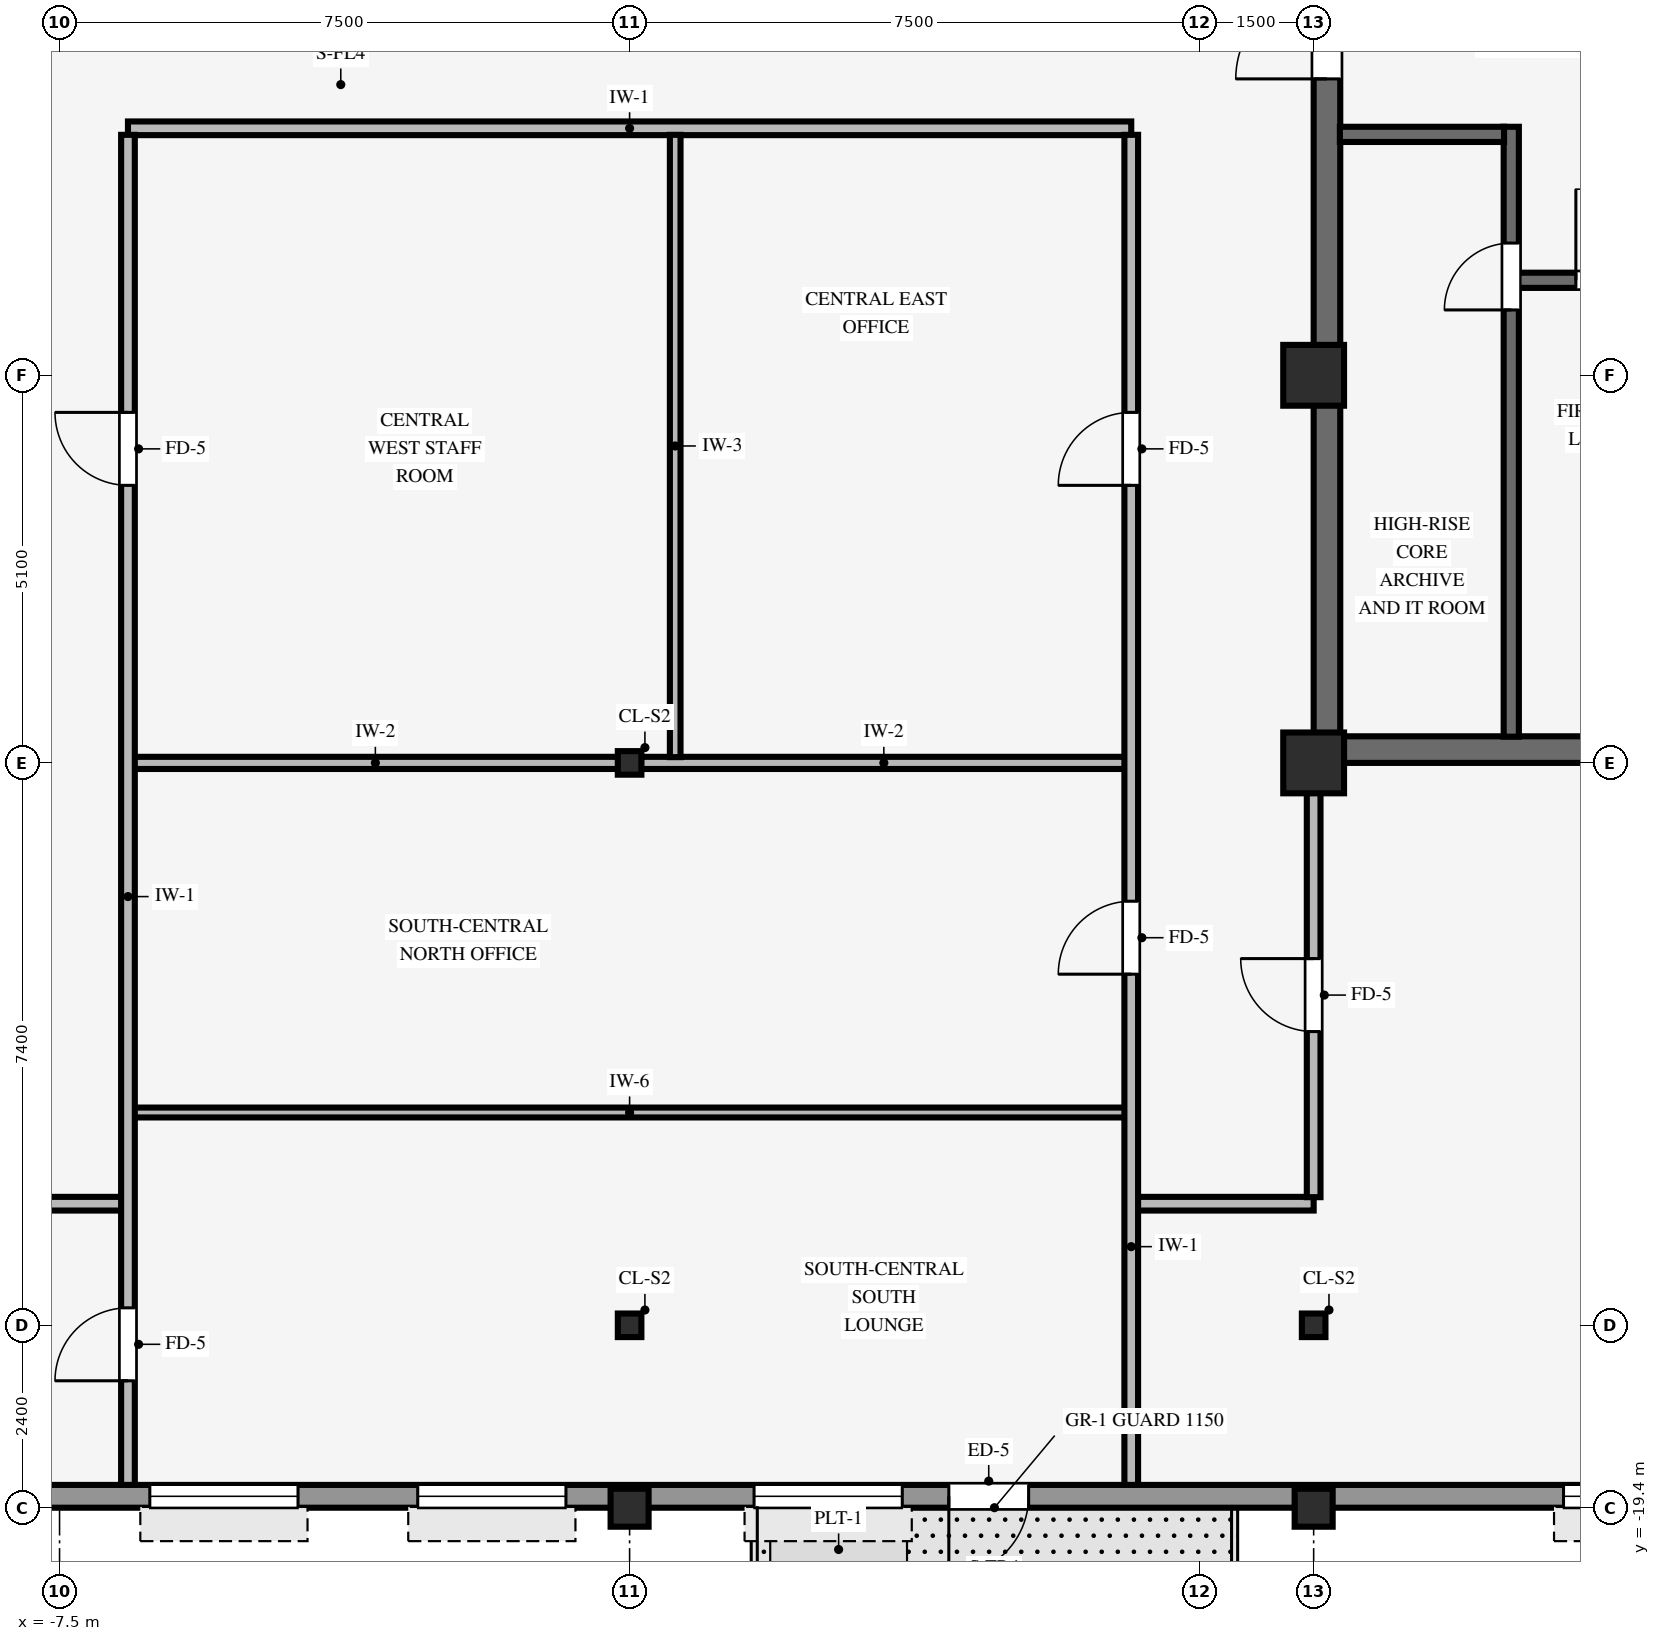
"""IFC4 building model, lengths in metres.
Left out: names, types, materials, properties, quantities, classifications, styles, units other than length and angle.
Written with IfcOpenShell. Run it as: python <this file> out.ifc"""

import sys

from ifc_helpers import new_model, si_unit, direction, frame, frame_2d, origin, origin_2d, place, context, subcontext, project, spatial, rectangle, hollow_rectangle, i_section, extrude, source, transform, mapped, element, fill, save


model = new_model("IFC4")
c1 = context("Model", 3, precision=1e-05, world=origin(), true_north=direction((0.0, 1.0)))
c2 = subcontext(c1, "Body", "Model", "MODEL_VIEW")
j1 = project(units=[si_unit("LENGTHUNIT", "METRE"), si_unit("PLANEANGLEUNIT", "RADIAN")], contexts=[c1])
p1 = place(None, origin())
s1 = spatial("IfcSite", under=j1, at=p1, CompositionType="ELEMENT")
p2 = place(p1, origin())
s2 = spatial("IfcBuilding", under=s1, at=p2, CompositionType="ELEMENT")
p3 = place(p2, frame((0.0, 0.0, 231.05)))
s3 = spatial("IfcBuildingStorey", under=s2, at=p3, CompositionType="ELEMENT", Elevation=231.05)
p4 = place(p3, frame((9.0, -9.425, 0.0), z_axis=(0.0, 0.0, 1.0), x_axis=(1.0, 0.0, 0.0)))
e1 = element("IfcWall", 1, at=p4, inside=s3, PredefinedType="SHEAR", context=c2, shape_type="SweptSolid", body=[
    extrude(rectangle(XDim=8.5, YDim=0.35, at=frame_2d((4.25, 0.0))), origin(), (0.0, 0.0, 1.0), 3.37),
])
p5 = place(p3, frame((9.175, -9.255, 0.0), z_axis=(0.0, 0.0, 1.0), x_axis=(0.0, 1.0, 0.0)))
e2 = element("IfcWall", 2, at=p5, inside=s3, PredefinedType="SHEAR", context=c2, shape_type="SweptSolid", body=[
    extrude(rectangle(XDim=18.51, YDim=0.35, at=frame_2d((9.255, 0.0))), origin(), (0.0, 0.0, 1.0), 3.37),
])
p6 = place(p5, frame((8.655, 0.0, 0.0)))
e3 = element("IfcOpeningElement", 3, at=p6, cuts=e2, PredefinedType="OPENING", context=c2, shape_type="SweptSolid", body=[
    extrude(rectangle(XDim=1.2, YDim=2.15, at=frame_2d((0.6, 1.075))), frame((0.0, 0.185, 0.0), z_axis=(0.0, -1.0, 0.0), x_axis=(1.0, 0.0, 0.0)), (0.0, 0.0, 1.0), 0.37),
])
for number, where, z_axis, x_axis in (
    (4, (9.0, -9.6, 0.0), (0.0, 0.0, 1.0), (1.0, 0.0, 0.0)),
    (5, (9.0, -4.5, 0.0), (0.0, 0.0, 1.0), (1.0, 0.0, 0.0)),
):
    element("IfcColumn", number, at=place(p3, frame(where, z_axis=z_axis, x_axis=x_axis)), inside=s3, PredefinedType="COLUMN", context=c2, shape_type="SweptSolid", body=[
        extrude(rectangle(XDim=0.8, YDim=0.8, at=origin_2d()), origin(), (0.0, 0.0, 1.0), 3.37),
    ])
for number, where, z_axis, x_axis in (
    (6, (0.0, -19.4, 0.0), (0.0, 0.0, 1.0), (1.0, 0.0, 0.0)),
    (7, (9.0, -19.4, 0.0), (0.0, 0.0, 1.0), (1.0, 0.0, 0.0)),
):
    element("IfcColumn", number, at=place(p3, frame(where, z_axis=z_axis, x_axis=x_axis)), inside=s3, PredefinedType="COLUMN", context=c2, shape_type="SweptSolid", body=[
        extrude(hollow_rectangle(XDim=0.5, YDim=0.5, WallThickness=0.032, InnerFilletRadius=0.032, OuterFilletRadius=0.064, at=origin_2d()), origin(), (0.0, 0.0, 1.0), 3.37),
    ])
for number, where, z_axis, x_axis in (
    (8, (0.0, -17.0, 0.0), (0.0, 0.0, 1.0), (1.0, 0.0, 0.0)),
    (9, (0.0, -9.6, 0.0), (0.0, 0.0, 1.0), (1.0, 0.0, 0.0)),
    (10, (9.0, -17.0, 0.0), (0.0, 0.0, 1.0), (1.0, 0.0, 0.0)),
):
    element("IfcColumn", number, at=place(p3, frame(where, z_axis=z_axis, x_axis=x_axis)), inside=s3, PredefinedType="COLUMN", context=c2, shape_type="SweptSolid", body=[
        extrude(i_section(OverallWidth=0.31, OverallDepth=0.31, WebThickness=0.015, FlangeThickness=0.015, FilletRadius=0.015, at=origin_2d()), origin(), (0.0, 0.0, 1.0), 3.37),
    ])
p7 = place(p3, frame((-24.3, -19.25, 0.0), z_axis=(0.0, 0.0, 1.0), x_axis=(1.0, 0.0, 0.0)))
e11 = element("IfcWall", 11, at=p7, inside=s3, PredefinedType="STANDARD", context=c2, shape_type="SweptSolid", body=[
    extrude(rectangle(XDim=41.0, YDim=0.3, at=frame_2d((20.5, 0.0))), origin(), (0.0, 0.0, 1.0), 2.705),
])
p8 = place(p7, frame((29.55, 0.0, 0.0), z_axis=(0.0, 0.0, 1.0), x_axis=(-1.0, 0.0, 0.0)))
e12 = element("IfcOpeningElement", 12, at=p8, cuts=e11, PredefinedType="OPENING", context=c2, shape_type="SweptSolid", body=[
    extrude(rectangle(XDim=1.05, YDim=2.1, at=frame_2d((0.525, 1.05))), frame((0.0, 0.16, 0.0), z_axis=(0.0, -1.0, 0.0), x_axis=(1.0, 0.0, 0.0)), (0.0, 0.0, 1.0), 0.32),
])
p9 = place(p7, frame((2.462, 0.0, 0.8)))
e13 = element("IfcOpeningElement", 13, at=p9, cuts=e11, PredefinedType="OPENING", context=c2, shape_type="SweptSolid", body=[
    extrude(rectangle(XDim=1.95, YDim=1.48, at=frame_2d((0.975, 0.74))), frame((0.0, 0.16, 0.0), z_axis=(0.0, -1.0, 0.0), x_axis=(1.0, 0.0, 0.0)), (0.0, 0.0, 1.0), 0.32),
])
p10 = place(p7, frame((7.788, 0.0, 0.8)))
e14 = element("IfcOpeningElement", 14, at=p10, cuts=e11, PredefinedType="OPENING", context=c2, shape_type="SweptSolid", body=[
    extrude(rectangle(XDim=1.95, YDim=1.48, at=frame_2d((0.975, 0.74))), frame((0.0, 0.16, 0.0), z_axis=(0.0, -1.0, 0.0), x_axis=(1.0, 0.0, 0.0)), (0.0, 0.0, 1.0), 0.32),
])
p11 = place(p7, frame((12.212, 0.0, 0.8)))
e15 = element("IfcOpeningElement", 15, at=p11, cuts=e11, PredefinedType="OPENING", context=c2, shape_type="SweptSolid", body=[
    extrude(rectangle(XDim=1.95, YDim=1.48, at=frame_2d((0.975, 0.74))), frame((0.0, 0.16, 0.0), z_axis=(0.0, -1.0, 0.0), x_axis=(1.0, 0.0, 0.0)), (0.0, 0.0, 1.0), 0.32),
])
p12 = place(p7, frame((17.988, 0.0, 0.8)))
e16 = element("IfcOpeningElement", 16, at=p12, cuts=e11, PredefinedType="OPENING", context=c2, shape_type="SweptSolid", body=[
    extrude(rectangle(XDim=1.95, YDim=1.48, at=frame_2d((0.975, 0.74))), frame((0.0, 0.16, 0.0), z_axis=(0.0, -1.0, 0.0), x_axis=(1.0, 0.0, 0.0)), (0.0, 0.0, 1.0), 0.32),
])
p13 = place(p7, frame((21.512, 0.0, 0.8)))
e17 = element("IfcOpeningElement", 17, at=p13, cuts=e11, PredefinedType="OPENING", context=c2, shape_type="SweptSolid", body=[
    extrude(rectangle(XDim=1.95, YDim=1.48, at=frame_2d((0.975, 0.74))), frame((0.0, 0.16, 0.0), z_axis=(0.0, -1.0, 0.0), x_axis=(1.0, 0.0, 0.0)), (0.0, 0.0, 1.0), 0.32),
])
p14 = place(p7, frame((25.938, 0.0, 0.8)))
e18 = element("IfcOpeningElement", 18, at=p14, cuts=e11, PredefinedType="OPENING", context=c2, shape_type="SweptSolid", body=[
    extrude(rectangle(XDim=1.95, YDim=1.48, at=frame_2d((0.975, 0.74))), frame((0.0, 0.16, 0.0), z_axis=(0.0, -1.0, 0.0), x_axis=(1.0, 0.0, 0.0)), (0.0, 0.0, 1.0), 0.32),
])
p15 = place(p7, frame((36.587, 0.0, 0.8)))
e19 = element("IfcOpeningElement", 19, at=p15, cuts=e11, PredefinedType="OPENING", context=c2, shape_type="SweptSolid", body=[
    extrude(rectangle(XDim=1.95, YDim=1.48, at=frame_2d((0.975, 0.74))), frame((0.0, 0.16, 0.0), z_axis=(0.0, -1.0, 0.0), x_axis=(1.0, 0.0, 0.0)), (0.0, 0.0, 1.0), 0.32),
])
p16 = place(p3, frame((11.6, -9.255, 0.0), z_axis=(0.0, 0.0, 1.0), x_axis=(0.0, 1.0, 0.0)))
e20 = element("IfcWall", 20, at=p16, inside=s3, PredefinedType="SHEAR", context=c2, shape_type="SweptSolid", body=[
    extrude(rectangle(XDim=8.025, YDim=0.2, at=frame_2d((4.012, 0.0))), origin(), (0.0, 0.0, 1.0), 3.37),
])
p17 = place(p16, frame((5.615, 0.0, 0.0)))
e21 = element("IfcOpeningElement", 21, at=p17, cuts=e20, PredefinedType="OPENING", context=c2, shape_type="SweptSolid", body=[
    extrude(rectangle(XDim=0.88, YDim=2.1, at=frame_2d((0.44, 1.05))), frame((0.0, 0.11, 0.0), z_axis=(0.0, -1.0, 0.0), x_axis=(1.0, 0.0, 0.0)), (0.0, 0.0, 1.0), 0.22),
])
p18 = place(p3, frame((11.695, -3.25, 0.0), z_axis=(0.0, 0.0, 1.0), x_axis=(1.0, 0.0, 0.0)))
e22 = element("IfcWall", 22, at=p18, inside=s3, PredefinedType="SHEAR", context=c2, shape_type="SweptSolid", body=[
    extrude(rectangle(XDim=2.76, YDim=0.2, at=frame_2d((1.38, 0.0))), origin(), (0.0, 0.0, 1.0), 3.37),
])
p19 = place(p18, frame((0.755, 0.0, 0.0)))
e23 = element("IfcOpeningElement", 23, at=p19, cuts=e22, PredefinedType="OPENING", context=c2, shape_type="SweptSolid", body=[
    extrude(rectangle(XDim=1.2, YDim=2.15, at=frame_2d((0.6, 1.075))), frame((0.0, 0.11, 0.0), z_axis=(0.0, -1.0, 0.0), x_axis=(1.0, 0.0, 0.0)), (0.0, 0.0, 1.0), 0.22),
])
p20 = place(p3, frame((9.345, -1.33, 0.0), z_axis=(0.0, 0.0, 1.0), x_axis=(1.0, 0.0, 0.0)))
e24 = element("IfcWall", 24, at=p20, inside=s3, PredefinedType="SHEAR", context=c2, shape_type="SweptSolid", body=[
    extrude(rectangle(XDim=2.16, YDim=0.2, at=frame_2d((1.08, 0.0))), origin(), (0.0, 0.0, 1.0), 3.37),
])
for number, where, z_axis, x_axis in (
    (25, (-9.0, -15.4, 0.0), (0.0, 0.0, 1.0), (1.0, 0.0, 0.0)),
    (26, (6.661, -15.4, 0.0), (0.0, 0.0, 1.0), (1.0, 0.0, 0.0)),
):
    element("IfcWall", number, at=place(p3, frame(where, z_axis=z_axis, x_axis=x_axis)), inside=s3, PredefinedType="PARTITIONING", context=c2, shape_type="SweptSolid", body=[
        extrude(rectangle(XDim=2.339, YDim=0.18, at=frame_2d((1.169, 0.0))), origin(), (0.0, 0.0, 1.0), 3.36),
    ])
p21 = place(p3, frame((-6.539, -14.2, 0.0), z_axis=(0.0, 0.0, 1.0), x_axis=(1.0, 0.0, 0.0)))
e27 = element("IfcWall", 27, at=p21, inside=s3, PredefinedType="PARTITIONING", context=c2, shape_type="SweptSolid", body=[
    extrude(rectangle(XDim=13.078, YDim=0.13, at=frame_2d((6.539, 0.0))), origin(), (0.0, 0.0, 1.0), 3.36),
])
for number, where, z_axis, x_axis in (
    (28, (-6.539, -9.6, 0.0), (0.0, 0.0, 1.0), (1.0, 0.0, 0.0)),
    (29, (0.151, -9.6, 0.0), (0.0, 0.0, 1.0), (1.0, 0.0, 0.0)),
):
    element("IfcWall", number, at=place(p3, frame(where, z_axis=z_axis, x_axis=x_axis)), inside=s3, PredefinedType="PARTITIONING", context=c2, shape_type="SweptSolid", body=[
        extrude(rectangle(XDim=6.388, YDim=0.16, at=frame_2d((3.194, 0.0))), origin(), (0.0, 0.0, 1.0), 2.405),
    ])
p22 = place(p3, frame((-6.6, -1.25, 0.0), z_axis=(0.0, 0.0, 1.0), x_axis=(1.0, 0.0, 0.0)))
e30 = element("IfcWall", 30, at=p22, inside=s3, PredefinedType="PARTITIONING", context=c2, shape_type="SweptSolid", body=[
    extrude(rectangle(XDim=13.2, YDim=0.18, at=frame_2d((6.6, 0.0))), origin(), (0.0, 0.0, 1.0), 3.36),
])
p23 = place(p3, frame((-6.6, -19.1, 0.0), z_axis=(0.0, 0.0, 1.0), x_axis=(0.0, 1.0, 0.0)))
e31 = element("IfcWall", 31, at=p23, inside=s3, PredefinedType="PARTITIONING", context=c2, shape_type="SweptSolid", body=[
    extrude(rectangle(XDim=17.764, YDim=0.18, at=frame_2d((8.882, 0.0))), origin(), (0.0, 0.0, 1.0), 3.36),
])
p24 = place(p23, frame((13.152, 0.0, 0.0)))
e32 = element("IfcOpeningElement", 32, at=p24, cuts=e31, PredefinedType="OPENING", context=c2, shape_type="SweptSolid", body=[
    extrude(rectangle(XDim=0.96, YDim=2.1, at=frame_2d((0.48, 1.05))), frame((0.0, 0.1, 0.0), z_axis=(0.0, -1.0, 0.0), x_axis=(1.0, 0.0, 0.0)), (0.0, 0.0, 1.0), 0.2),
])
p25 = place(p23, frame((1.37, 0.0, 0.0)))
e33 = element("IfcOpeningElement", 33, at=p25, cuts=e31, PredefinedType="OPENING", context=c2, shape_type="SweptSolid", body=[
    extrude(rectangle(XDim=0.96, YDim=2.1, at=frame_2d((0.48, 1.05))), frame((0.0, 0.1, 0.0), z_axis=(0.0, -1.0, 0.0), x_axis=(1.0, 0.0, 0.0)), (0.0, 0.0, 1.0), 0.2),
])
p26 = place(p3, frame((0.6, -9.524, 0.0), z_axis=(0.0, 0.0, 1.0), x_axis=(0.0, 1.0, 0.0)))
e34 = element("IfcWall", 34, at=p26, inside=s3, PredefinedType="PARTITIONING", context=c2, shape_type="SweptSolid", body=[
    extrude(rectangle(XDim=8.188, YDim=0.14, at=frame_2d((4.094, 0.0))), origin(), (0.0, 0.0, 1.0), 3.36),
])
p27 = place(p3, frame((6.6, -19.1, 0.0), z_axis=(0.0, 0.0, 1.0), x_axis=(0.0, 1.0, 0.0)))
e35 = element("IfcWall", 35, at=p27, inside=s3, PredefinedType="PARTITIONING", context=c2, shape_type="SweptSolid", body=[
    extrude(rectangle(XDim=17.764, YDim=0.18, at=frame_2d((8.882, 0.0))), origin(), (0.0, 0.0, 1.0), 3.36),
])
p28 = place(p27, frame((13.152, 0.0, 0.0)))
e36 = element("IfcOpeningElement", 36, at=p28, cuts=e35, PredefinedType="OPENING", context=c2, shape_type="SweptSolid", body=[
    extrude(rectangle(XDim=0.96, YDim=2.1, at=frame_2d((0.48, 1.05))), frame((0.0, 0.1, 0.0), z_axis=(0.0, -1.0, 0.0), x_axis=(1.0, 0.0, 0.0)), (0.0, 0.0, 1.0), 0.2),
])
p29 = place(p27, frame((6.72, 0.0, 0.0)))
e37 = element("IfcOpeningElement", 37, at=p29, cuts=e35, PredefinedType="OPENING", context=c2, shape_type="SweptSolid", body=[
    extrude(rectangle(XDim=0.96, YDim=2.1, at=frame_2d((0.48, 1.05))), frame((0.0, 0.1, 0.0), z_axis=(0.0, -1.0, 0.0), x_axis=(1.0, 0.0, 0.0)), (0.0, 0.0, 1.0), 0.2),
])
p30 = place(p3, frame((9.0, -15.314, 0.0), z_axis=(0.0, 0.0, 1.0), x_axis=(0.0, 1.0, 0.0)))
e38 = element("IfcWall", 38, at=p30, inside=s3, PredefinedType="PARTITIONING", context=c2, shape_type="SweptSolid", body=[
    extrude(rectangle(XDim=5.318, YDim=0.18, at=frame_2d((2.659, 0.0))), origin(), (0.0, 0.0, 1.0), 2.892),
])
p31 = place(p30, frame((2.179, 0.0, 0.0)))
e39 = element("IfcOpeningElement", 39, at=p31, cuts=e38, PredefinedType="OPENING", context=c2, shape_type="SweptSolid", body=[
    extrude(rectangle(XDim=0.96, YDim=2.1, at=frame_2d((0.48, 1.05))), frame((0.0, 0.1, 0.0), z_axis=(0.0, -1.0, 0.0), x_axis=(1.0, 0.0, 0.0)), (0.0, 0.0, 1.0), 0.2),
])
m1 = source(origin(), c2, "Body", "SweptSolid", [
    extrude(rectangle(XDim=1.05, YDim=2.1, at=frame_2d((0.525, 1.05))), frame((0.0, 0.025, 0.0), z_axis=(0.0, -1.0, 0.0), x_axis=(1.0, 0.0, 0.0)), (0.0, 0.0, 1.0), 0.05),
])
p32 = place(p8, origin())
e40 = element("IfcDoor", 40, at=p32, inside=s3, OperationType="SINGLE_SWING_RIGHT", PredefinedType="DOOR", context=c2, shape_type="MappedRepresentation", body=[
    mapped(m1, transform((0.0, 0.0, 0.0), scale=1.0)),
])
fill(e12, e40)
m2 = source(origin(), c2, "Body", "SweptSolid", [
    extrude(rectangle(XDim=1.95, YDim=1.48, at=frame_2d((0.975, 0.74))), frame((0.0, 0.03, 0.0), z_axis=(0.0, -1.0, 0.0), x_axis=(1.0, 0.0, 0.0)), (0.0, 0.0, 1.0), 0.06),
])
p33 = place(p12, origin())
e41 = element("IfcWindow", 41, at=p33, inside=s3, PartitioningType="SINGLE_PANEL", PredefinedType="WINDOW", context=c2, shape_type="MappedRepresentation", body=[
    mapped(m2, transform((0.0, 0.0, 0.0), scale=1.0)),
])
fill(e16, e41)
p34 = place(p13, origin())
e42 = element("IfcWindow", 42, at=p34, inside=s3, PartitioningType="SINGLE_PANEL", PredefinedType="WINDOW", context=c2, shape_type="MappedRepresentation", body=[
    mapped(m2, transform((0.0, 0.0, 0.0), scale=1.0)),
])
fill(e17, e42)
p35 = place(p14, origin())
e43 = element("IfcWindow", 43, at=p35, inside=s3, PartitioningType="SINGLE_PANEL", PredefinedType="WINDOW", context=c2, shape_type="MappedRepresentation", body=[
    mapped(m2, transform((0.0, 0.0, 0.0), scale=1.0)),
])
fill(e18, e43)
p36 = place(p15, origin())
e44 = element("IfcWindow", 44, at=p36, inside=s3, PartitioningType="SINGLE_PANEL", PredefinedType="WINDOW", context=c2, shape_type="MappedRepresentation", body=[
    mapped(m2, transform((0.0, 0.0, 0.0), scale=1.0)),
])
fill(e19, e44)
m3 = source(origin(), c2, "Body", "SweptSolid", [
    extrude(rectangle(XDim=1.2, YDim=2.15, at=frame_2d((0.6, 1.075))), frame((0.0, 0.025, 0.0), z_axis=(0.0, -1.0, 0.0), x_axis=(1.0, 0.0, 0.0)), (0.0, 0.0, 1.0), 0.05),
])
p37 = place(p19, origin())
e45 = element("IfcDoor", 45, at=p37, inside=s3, OperationType="SINGLE_SWING_LEFT", PredefinedType="DOOR", context=c2, shape_type="MappedRepresentation", body=[
    mapped(m3, transform((0.0, 0.0, 0.0), scale=1.0)),
])
fill(e23, e45)
m4 = source(origin(), c2, "Body", "SweptSolid", [
    extrude(rectangle(XDim=0.88, YDim=2.1, at=frame_2d((0.44, 1.05))), frame((0.0, 0.025, 0.0), z_axis=(0.0, -1.0, 0.0), x_axis=(1.0, 0.0, 0.0)), (0.0, 0.0, 1.0), 0.05),
])
p38 = place(p17, origin())
e46 = element("IfcDoor", 46, at=p38, inside=s3, OperationType="SINGLE_SWING_LEFT", PredefinedType="DOOR", context=c2, shape_type="MappedRepresentation", body=[
    mapped(m4, transform((0.0, 0.0, 0.0), scale=1.0)),
])
fill(e21, e46)
p39 = place(p6, origin())
e47 = element("IfcDoor", 47, at=p39, inside=s3, OperationType="SINGLE_SWING_LEFT", PredefinedType="DOOR", context=c2, shape_type="MappedRepresentation", body=[
    mapped(m3, transform((0.0, 0.0, 0.0), scale=1.0)),
])
fill(e3, e47)
m5 = source(origin(), c2, "Body", "SweptSolid", [
    extrude(rectangle(XDim=0.96, YDim=2.1, at=frame_2d((0.48, 1.05))), frame((0.0, 0.025, 0.0), z_axis=(0.0, -1.0, 0.0), x_axis=(1.0, 0.0, 0.0)), (0.0, 0.0, 1.0), 0.05),
])
p40 = place(p24, origin())
e48 = element("IfcDoor", 48, at=p40, inside=s3, OperationType="SINGLE_SWING_RIGHT", PredefinedType="DOOR", context=c2, shape_type="MappedRepresentation", body=[
    mapped(m5, transform((0.0, 0.0, 0.0), scale=1.0)),
])
fill(e32, e48)
p41 = place(p28, origin())
e49 = element("IfcDoor", 49, at=p41, inside=s3, OperationType="SINGLE_SWING_LEFT", PredefinedType="DOOR", context=c2, shape_type="MappedRepresentation", body=[
    mapped(m5, transform((0.0, 0.0, 0.0), scale=1.0)),
])
fill(e36, e49)
p42 = place(p31, origin())
e50 = element("IfcDoor", 50, at=p42, inside=s3, OperationType="SINGLE_SWING_RIGHT", PredefinedType="DOOR", context=c2, shape_type="MappedRepresentation", body=[
    mapped(m5, transform((0.0, 0.0, 0.0), scale=1.0)),
])
fill(e39, e50)
p43 = place(p29, origin())
e51 = element("IfcDoor", 51, at=p43, inside=s3, OperationType="SINGLE_SWING_LEFT", PredefinedType="DOOR", context=c2, shape_type="MappedRepresentation", body=[
    mapped(m5, transform((0.0, 0.0, 0.0), scale=1.0)),
])
fill(e37, e51)
p44 = place(p25, origin())
e52 = element("IfcDoor", 52, at=p44, inside=s3, OperationType="SINGLE_SWING_LEFT", PredefinedType="DOOR", context=c2, shape_type="MappedRepresentation", body=[
    mapped(m5, transform((0.0, 0.0, 0.0), scale=1.0)),
])
fill(e33, e52)
save(model, sys.argv[1])
